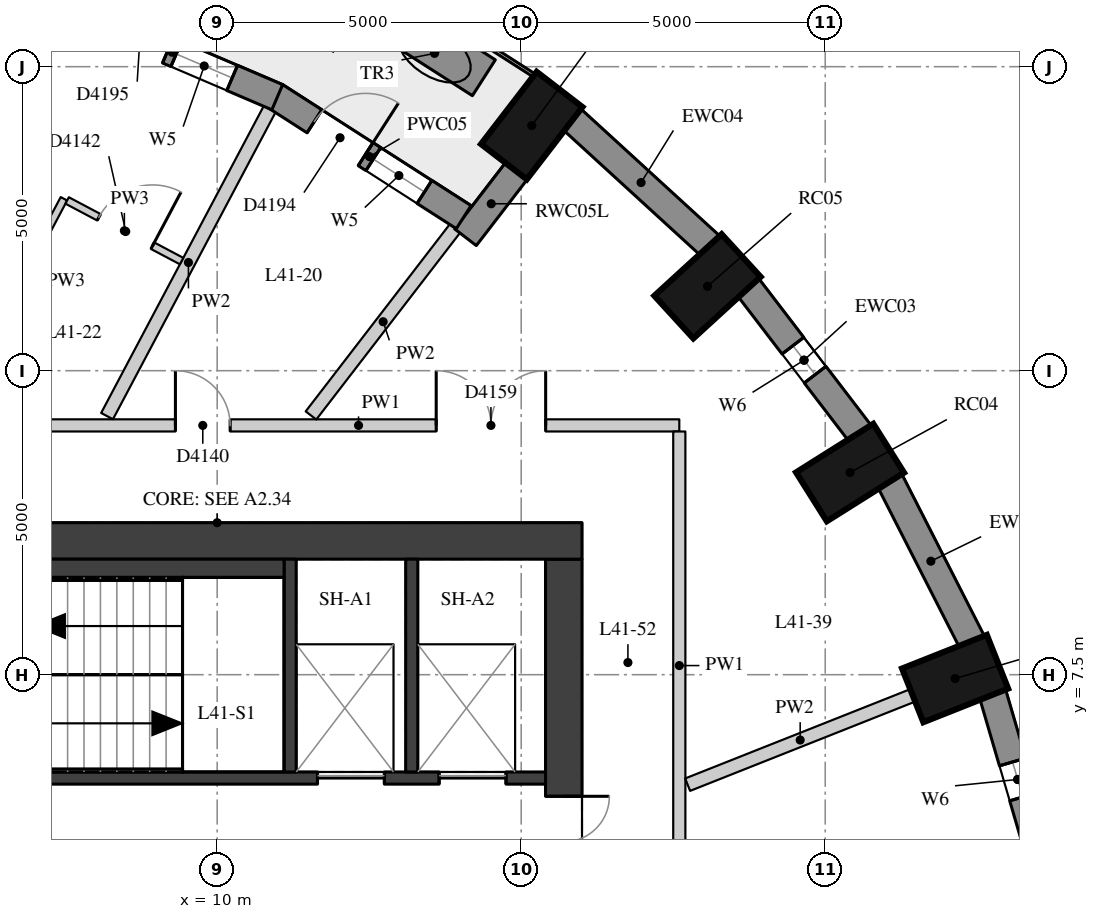
"""IFC4 building model, lengths in metres.
Left out: names, types, materials, properties, quantities, classifications, styles, units other than length and angle.
Written with IfcOpenShell. Run it as: python <this file> out.ifc"""

import sys

from ifc_helpers import new_model, si_unit, direction, frame, frame_2d, origin, origin_2d, place, context, subcontext, project, spatial, rectangle, extrude, element, fill, save


model = new_model("IFC4")
c1 = context("Model", 3, precision=1e-05, world=origin(), true_north=direction((0.0, 1.0)))
c2 = subcontext(c1, "Body", "Model", "MODEL_VIEW")
j1 = project(units=[si_unit("LENGTHUNIT", "METRE"), si_unit("PLANEANGLEUNIT", "RADIAN")], contexts=[c1])
p1 = place(None, origin())
s1 = spatial("IfcSite", under=j1, at=p1, CompositionType="ELEMENT")
p2 = place(p1, origin())
s2 = spatial("IfcBuilding", under=s1, at=p2, CompositionType="ELEMENT")
p3 = place(p2, frame((0.0, 0.0, 148.4)))
s3 = spatial("IfcBuildingStorey", under=s2, at=p3, CompositionType="ELEMENT", Elevation=148.4)
for number, where, z_axis, x_axis in (
    (1, (22.136, 7.436, 0.0), (0.0, 0.0, 1.0), (0.93, 0.369, 0.0)),
    (2, (20.408, 10.825, 0.0), (0.0, 0.0, 1.0), (0.846, 0.533, 0.0)),
    (3, (18.064, 13.888, 0.0), (0.0, 0.0, 1.0), (0.738, 0.675, 0.0)),
    (4, (15.173, 16.532, 0.0), (0.0, 0.0, 1.0), (0.61, 0.792, 0.0)),
):
    element("IfcColumn", number, at=place(p3, frame(where, z_axis=z_axis, x_axis=x_axis)), inside=s3, PredefinedType="COLUMN", context=c2, shape_type="SweptSolid", body=[
        extrude(rectangle(XDim=1.5, YDim=0.95, at=origin_2d()), origin(), (0.0, 0.0, 1.0), 3.3),
    ])
p4 = place(p3, frame((23.58, 4.362, 0.0), z_axis=(0.0, 0.0, 1.0), x_axis=(-0.281049481624, 0.959693278542, 0.0)))
e5 = element("IfcWall", 5, at=p4, inside=s3, PredefinedType="SOLIDWALL", context=c2, shape_type="SweptSolid", body=[
    extrude(rectangle(XDim=2.948, YDim=0.45, at=frame_2d((1.474, 0.0))), origin(), (0.0, 0.0, 1.0), 3.02),
])
p5 = place(p4, frame((1.174, 0.0, 0.4)))
e6 = element("IfcOpeningElement", 6, at=p5, cuts=e5, PredefinedType="OPENING", context=c2, shape_type="SweptSolid", body=[
    extrude(rectangle(XDim=0.6, YDim=1.75, at=frame_2d((0.3, 0.875))), frame((0.0, 0.235, 0.0), z_axis=(0.0, -1.0, 0.0), x_axis=(1.0, 0.0, 0.0)), (0.0, 0.0, 1.0), 0.47),
])
p6 = place(p3, frame((22.415, 8.037, 0.0), z_axis=(0.0, 0.0, 1.0), x_axis=(-0.454133999889, 0.890933392653, 0.0)))
e7 = element("IfcWall", 7, at=p6, inside=s3, PredefinedType="SOLIDWALL", context=c2, shape_type="SweptSolid", body=[
    extrude(rectangle(XDim=2.986, YDim=0.45, at=frame_2d((1.493, 0.0))), origin(), (0.0, 0.0, 1.0), 3.02),
])
p7 = place(p3, frame((20.574, 11.467, 0.0), z_axis=(0.0, 0.0, 1.0), x_axis=(-0.607817056371, 0.794077090706, 0.0)))
e8 = element("IfcWall", 8, at=p7, inside=s3, PredefinedType="SOLIDWALL", context=c2, shape_type="SweptSolid", body=[
    extrude(rectangle(XDim=3.037, YDim=0.45, at=frame_2d((1.519, 0.0))), origin(), (0.0, 0.0, 1.0), 3.02),
])
p8 = place(p7, frame((1.219, 0.0, 0.4)))
e9 = element("IfcOpeningElement", 9, at=p8, cuts=e8, PredefinedType="OPENING", context=c2, shape_type="SweptSolid", body=[
    extrude(rectangle(XDim=0.6, YDim=1.75, at=frame_2d((0.3, 0.875))), frame((0.0, 0.235, 0.0), z_axis=(0.0, -1.0, 0.0), x_axis=(1.0, 0.0, 0.0)), (0.0, 0.0, 1.0), 0.47),
])
p9 = place(p3, frame((18.113, 14.55, 0.0), z_axis=(0.0, 0.0, 1.0), x_axis=(-0.737808755941, 0.675009807082, 0.0)))
e10 = element("IfcWall", 10, at=p9, inside=s3, PredefinedType="SOLIDWALL", context=c2, shape_type="SweptSolid", body=[
    extrude(rectangle(XDim=3.094, YDim=0.45, at=frame_2d((1.547, 0.0))), origin(), (0.0, 0.0, 1.0), 3.02),
])
p10 = place(p3, frame((14.931, 15.797, 0.0), z_axis=(0.0, 0.0, 1.0), x_axis=(-0.609897399413, -0.792480385996, 0.0)))
e11 = element("IfcWall", 11, at=p10, inside=s3, PredefinedType="SOLIDWALL", context=c2, shape_type="SweptSolid", body=[
    extrude(rectangle(XDim=1.391, YDim=0.45, at=frame_2d((0.695, 0.0))), origin(), (0.0, 0.0, 1.0), 3.02),
])
p11 = place(p3, frame((14.054, 15.025, 0.0), z_axis=(0.0, 0.0, 1.0), x_axis=(-0.841393801846, 0.54042249233, 0.0)))
e12 = element("IfcWall", 12, at=p11, inside=s3, PredefinedType="SOLIDWALL", context=c2, shape_type="SweptSolid", body=[
    extrude(rectangle(XDim=3.683, YDim=0.45, at=frame_2d((1.841, 0.0))), origin(), (0.0, 0.0, 1.0), 3.02),
])
p12 = place(p11, frame((0.766, 0.0, 0.4)))
e13 = element("IfcOpeningElement", 13, at=p12, cuts=e12, PredefinedType="OPENING", context=c2, shape_type="SweptSolid", body=[
    extrude(rectangle(XDim=1.0, YDim=1.75, at=frame_2d((0.5, 0.875))), frame((0.0, 0.235, 0.0), z_axis=(0.0, -1.0, 0.0), x_axis=(1.0, 0.0, 0.0)), (0.0, 0.0, 1.0), 0.47),
])
p13 = place(p11, frame((1.916, 0.0, 0.0)))
e14 = element("IfcOpeningElement", 14, at=p13, cuts=e12, PredefinedType="OPENING", context=c2, shape_type="SweptSolid", body=[
    extrude(rectangle(XDim=1.0, YDim=2.15, at=frame_2d((0.5, 1.075))), frame((0.0, 0.235, 0.0), z_axis=(0.0, -1.0, 0.0), x_axis=(1.0, 0.0, 0.0)), (0.0, 0.0, 1.0), 0.47),
])
p14 = place(p3, frame((10.988, 16.998, 0.0), z_axis=(0.0, 0.0, 1.0), x_axis=(-0.919443425894, 0.393222311907, 0.0)))
e15 = element("IfcWall", 15, at=p14, inside=s3, PredefinedType="SOLIDWALL", context=c2, shape_type="SweptSolid", body=[
    extrude(rectangle(XDim=3.763, YDim=0.45, at=frame_2d((1.882, 0.0))), origin(), (0.0, 0.0, 1.0), 3.02),
])
p15 = place(p14, frame((0.807, 0.0, 0.4)))
e16 = element("IfcOpeningElement", 16, at=p15, cuts=e15, PredefinedType="OPENING", context=c2, shape_type="SweptSolid", body=[
    extrude(rectangle(XDim=1.0, YDim=1.75, at=frame_2d((0.5, 0.875))), frame((0.0, 0.235, 0.0), z_axis=(0.0, -1.0, 0.0), x_axis=(1.0, 0.0, 0.0)), (0.0, 0.0, 1.0), 0.47),
])
p16 = place(p14, frame((1.957, 0.0, 0.0)))
e17 = element("IfcOpeningElement", 17, at=p16, cuts=e15, PredefinedType="OPENING", context=c2, shape_type="SweptSolid", body=[
    extrude(rectangle(XDim=1.0, YDim=2.15, at=frame_2d((0.5, 1.075))), frame((0.0, 0.235, 0.0), z_axis=(0.0, -1.0, 0.0), x_axis=(1.0, 0.0, 0.0)), (0.0, 0.0, 1.0), 0.47),
])
p17 = place(p3, frame((14.386, 17.318, 0.0), z_axis=(0.0, 0.0, 1.0), x_axis=(-0.842032375698, 0.539426990682, 0.0)))
e18 = element("IfcWall", 18, at=p17, inside=s3, PredefinedType="USERDEFINED", context=c2, shape_type="SweptSolid", body=[
    extrude(rectangle(XDim=1.8, YDim=0.7, at=frame_2d((0.9, 0.0))), origin(), (0.0, 0.0, 1.0), 0.75),
])
p18 = place(p3, frame((15.7, -9.4, 0.0), z_axis=(0.0, 0.0, 1.0), x_axis=(0.0, 1.0, 0.0)))
e19 = element("IfcWall", 19, at=p18, inside=s3, PredefinedType="SHEAR", context=c2, shape_type="SweptSolid", body=[
    extrude(rectangle(XDim=18.8, YDim=0.6, at=frame_2d((9.4, 0.0))), origin(), (0.0, 0.0, 1.0), 3.02),
])
p19 = place(p18, frame((13.4, 0.0, 0.0)))
e20 = element("IfcOpeningElement", 20, at=p19, cuts=e19, PredefinedType="OPENING", context=c2, shape_type="SweptSolid", body=[
    extrude(rectangle(XDim=1.5, YDim=2.1, at=frame_2d((0.75, 1.05))), frame((0.0, 0.31, 0.0), z_axis=(0.0, -1.0, 0.0), x_axis=(1.0, 0.0, 0.0)), (0.0, 0.0, 1.0), 0.62),
])
p20 = place(p18, frame((3.9, 0.0, 0.0)))
e21 = element("IfcOpeningElement", 21, at=p20, cuts=e19, PredefinedType="OPENING", context=c2, shape_type="SweptSolid", body=[
    extrude(rectangle(XDim=1.5, YDim=2.1, at=frame_2d((0.75, 1.05))), frame((0.0, 0.31, 0.0), z_axis=(0.0, -1.0, 0.0), x_axis=(1.0, 0.0, 0.0)), (0.0, 0.0, 1.0), 0.62),
])
p21 = place(p3, frame((4.0, 9.7, 0.0), z_axis=(0.0, 0.0, 1.0), x_axis=(1.0, 0.0, 0.0)))
e22 = element("IfcWall", 22, at=p21, inside=s3, PredefinedType="SHEAR", context=c2, shape_type="SweptSolid", body=[
    extrude(rectangle(XDim=12.0, YDim=0.6, at=frame_2d((6.0, 0.0))), origin(), (0.0, 0.0, 1.0), 3.02),
])
p22 = place(p3, frame((4.6, 5.8, 0.0), z_axis=(0.0, 0.0, 1.0), x_axis=(1.0, 0.0, 0.0)))
e23 = element("IfcWall", 23, at=p22, inside=s3, PredefinedType="SHEAR", context=c2, shape_type="SweptSolid", body=[
    extrude(rectangle(XDim=10.8, YDim=0.2, at=frame_2d((5.4, 0.0))), origin(), (0.0, 0.0, 1.0), 3.02),
])
p23 = place(p22, frame((7.05, 0.0, 0.0)))
e24 = element("IfcOpeningElement", 24, at=p23, cuts=e23, PredefinedType="OPENING", context=c2, shape_type="SweptSolid", body=[
    extrude(rectangle(XDim=1.1, YDim=2.1, at=frame_2d((0.55, 1.05))), frame((0.0, 0.11, 0.0), z_axis=(0.0, -1.0, 0.0), x_axis=(1.0, 0.0, 0.0)), (0.0, 0.0, 1.0), 0.22),
])
p24 = place(p22, frame((9.05, 0.0, 0.0)))
e25 = element("IfcOpeningElement", 25, at=p24, cuts=e23, PredefinedType="OPENING", context=c2, shape_type="SweptSolid", body=[
    extrude(rectangle(XDim=1.1, YDim=2.1, at=frame_2d((0.55, 1.05))), frame((0.0, 0.11, 0.0), z_axis=(0.0, -1.0, 0.0), x_axis=(1.0, 0.0, 0.0)), (0.0, 0.0, 1.0), 0.22),
])
for number, where, z_axis, x_axis in (
    (26, (11.2, 5.9, 0.0), (0.0, 0.0, 1.0), (0.0, 1.0, 0.0)),
    (27, (13.2, 5.9, 0.0), (0.0, 0.0, 1.0), (0.0, 1.0, 0.0)),
):
    element("IfcWall", number, at=place(p3, frame(where, z_axis=z_axis, x_axis=x_axis)), inside=s3, PredefinedType="SHEAR", context=c2, shape_type="SweptSolid", body=[
        extrude(rectangle(XDim=3.5, YDim=0.2, at=frame_2d((1.75, 0.0))), origin(), (0.0, 0.0, 1.0), 3.02),
    ])
p25 = place(p3, frame((6.22, 9.25, 0.0), z_axis=(0.0, 0.0, 1.0), x_axis=(1.0, 0.0, 0.0)))
e28 = element("IfcWall", 28, at=p25, inside=s3, PredefinedType="PARTITIONING", context=c2, shape_type="SweptSolid", body=[
    extrude(rectangle(XDim=4.88, YDim=0.3, at=frame_2d((2.44, 0.0))), origin(), (0.0, 0.0, 1.0), 3.02),
])
p26 = place(p3, frame((7.05, 11.6, 0.0), z_axis=(0.0, 0.0, 1.0), x_axis=(1.0, 0.0, 0.0)))
e29 = element("IfcWall", 29, at=p26, inside=s3, PredefinedType="PARTITIONING", context=c2, shape_type="SweptSolid", body=[
    extrude(rectangle(XDim=10.551, YDim=0.2, at=frame_2d((5.275, 0.0))), origin(), (0.0, 0.0, 1.0), 3.02),
])
p27 = place(p26, frame((2.264, 0.0, 0.0)))
e30 = element("IfcOpeningElement", 30, at=p27, cuts=e29, PredefinedType="OPENING", context=c2, shape_type="SweptSolid", body=[
    extrude(rectangle(XDim=0.9, YDim=2.1, at=frame_2d((0.45, 1.05))), frame((0.0, 0.11, 0.0), z_axis=(0.0, -1.0, 0.0), x_axis=(1.0, 0.0, 0.0)), (0.0, 0.0, 1.0), 0.22),
])
p28 = place(p26, frame((6.553, 0.0, 0.0)))
e31 = element("IfcOpeningElement", 31, at=p28, cuts=e29, PredefinedType="OPENING", context=c2, shape_type="SweptSolid", body=[
    extrude(rectangle(XDim=1.8, YDim=2.1, at=frame_2d((0.9, 1.05))), frame((0.0, 0.11, 0.0), z_axis=(0.0, -1.0, 0.0), x_axis=(1.0, 0.0, 0.0)), (0.0, 0.0, 1.0), 0.22),
])
p29 = place(p3, frame((17.6, 11.5, 0.0), z_axis=(0.0, 0.0, 1.0), x_axis=(0.0, -1.0, 0.0)))
e32 = element("IfcWall", 32, at=p29, inside=s3, PredefinedType="PARTITIONING", context=c2, shape_type="SweptSolid", body=[
    extrude(rectangle(XDim=7.7, YDim=0.2, at=frame_2d((3.85, 0.0))), origin(), (0.0, 0.0, 1.0), 3.02),
])
p30 = place(p3, frame((21.439, 7.16, 0.0), z_axis=(0.0, 0.0, 1.0), x_axis=(-0.929517399972, -0.368778257426, 0.0)))
e33 = element("IfcWall", 33, at=p30, inside=s3, PredefinedType="PARTITIONING", context=c2, shape_type="SweptSolid", body=[
    extrude(rectangle(XDim=3.982, YDim=0.22, at=frame_2d((1.991, 0.0))), origin(), (0.0, 0.0, 1.0), 3.02),
])
p31 = place(p3, frame((13.916, 14.846, 0.0), z_axis=(0.0, 0.0, 1.0), x_axis=(-0.610023079405, -0.792383646091, 0.0)))
e34 = element("IfcWall", 34, at=p31, inside=s3, PredefinedType="PARTITIONING", context=c2, shape_type="SweptSolid", body=[
    extrude(rectangle(XDim=3.89, YDim=0.22, at=frame_2d((1.945, 0.0))), origin(), (0.0, 0.0, 1.0), 3.02),
])
p32 = place(p3, frame((10.865, 16.806, 0.0), z_axis=(0.0, 0.0, 1.0), x_axis=(-0.468046615648, -0.883703777054, 0.0)))
e35 = element("IfcWall", 35, at=p32, inside=s3, PredefinedType="PARTITIONING", context=c2, shape_type="SweptSolid", body=[
    extrude(rectangle(XDim=5.718, YDim=0.22, at=frame_2d((2.859, 0.0))), origin(), (0.0, 0.0, 1.0), 3.02),
])
p33 = place(p3, frame((6.042, 12.614, 0.0), z_axis=(0.0, 0.0, 1.0), x_axis=(0.46804844257, 0.883702809438, 0.0)))
e36 = element("IfcWall", 36, at=p33, inside=s3, PredefinedType="PARTITIONING", context=c2, shape_type="SweptSolid", body=[
    extrude(rectangle(XDim=3.071, YDim=0.12, at=frame_2d((1.535, 0.0))), origin(), (0.0, 0.0, 1.0), 3.02),
])
p34 = place(p3, frame((7.532, 15.3, 0.0), z_axis=(0.0, 0.0, 1.0), x_axis=(0.883707061275, -0.468040414764, 0.0)))
e37 = element("IfcWall", 37, at=p34, inside=s3, PredefinedType="PARTITIONING", context=c2, shape_type="SweptSolid", body=[
    extrude(rectangle(XDim=2.13, YDim=0.12, at=frame_2d((1.065, 0.0))), origin(), (0.0, 0.0, 1.0), 3.02),
])
p35 = place(p34, frame((0.59, 0.0, 0.0)))
e38 = element("IfcOpeningElement", 38, at=p35, cuts=e37, PredefinedType="OPENING", context=c2, shape_type="SweptSolid", body=[
    extrude(rectangle(XDim=1.0, YDim=2.1, at=frame_2d((0.5, 1.05))), frame((0.0, 0.07, 0.0), z_axis=(0.0, -1.0, 0.0), x_axis=(1.0, 0.0, 0.0)), (0.0, 0.0, 1.0), 0.14),
])
p36 = place(p5, origin())
e39 = element("IfcWindow", 39, at=p36, inside=s3, PartitioningType="SINGLE_PANEL", PredefinedType="WINDOW", context=c2, shape_type="SweptSolid", body=[
    extrude(rectangle(XDim=0.6, YDim=1.75, at=frame_2d((0.3, 0.875))), frame((0.0, 0.035, 0.0), z_axis=(0.0, -1.0, 0.0), x_axis=(1.0, 0.0, 0.0)), (0.0, 0.0, 1.0), 0.06),
])
fill(e6, e39)
p37 = place(p8, origin())
e40 = element("IfcWindow", 40, at=p37, inside=s3, PartitioningType="SINGLE_PANEL", PredefinedType="WINDOW", context=c2, shape_type="SweptSolid", body=[
    extrude(rectangle(XDim=0.6, YDim=1.75, at=frame_2d((0.3, 0.875))), frame((0.0, 0.035, 0.0), z_axis=(0.0, -1.0, 0.0), x_axis=(1.0, 0.0, 0.0)), (0.0, 0.0, 1.0), 0.06),
])
fill(e9, e40)
p38 = place(p12, origin())
e41 = element("IfcWindow", 41, at=p38, inside=s3, PartitioningType="SINGLE_PANEL", PredefinedType="WINDOW", context=c2, shape_type="SweptSolid", body=[
    extrude(rectangle(XDim=1.0, YDim=1.75, at=frame_2d((0.5, 0.875))), frame((0.0, 0.035, 0.0), z_axis=(0.0, -1.0, 0.0), x_axis=(1.0, 0.0, 0.0)), (0.0, 0.0, 1.0), 0.06),
])
fill(e13, e41)
p39 = place(p13, frame((1.0, 0.0, 0.0), z_axis=(0.0, 0.0, 1.0), x_axis=(-1.0, 0.0, 0.0)))
e42 = element("IfcDoor", 42, at=p39, inside=s3, OperationType="SINGLE_SWING_RIGHT", PredefinedType="DOOR", context=c2, shape_type="SweptSolid", body=[
    extrude(rectangle(XDim=1.0, YDim=2.15, at=frame_2d((0.5, 1.075))), frame((0.0, 0.075, 0.0), z_axis=(0.0, -1.0, 0.0), x_axis=(1.0, 0.0, 0.0)), (0.0, 0.0, 1.0), 0.05),
])
fill(e14, e42)
p40 = place(p15, origin())
e43 = element("IfcWindow", 43, at=p40, inside=s3, PartitioningType="SINGLE_PANEL", PredefinedType="WINDOW", context=c2, shape_type="SweptSolid", body=[
    extrude(rectangle(XDim=1.0, YDim=1.75, at=frame_2d((0.5, 0.875))), frame((0.0, 0.035, 0.0), z_axis=(0.0, -1.0, 0.0), x_axis=(1.0, 0.0, 0.0)), (0.0, 0.0, 1.0), 0.06),
])
fill(e16, e43)
p41 = place(p19, origin())
e44 = element("IfcDoor", 44, at=p41, inside=s3, OperationType="DOUBLE_DOOR_SINGLE_SWING", PredefinedType="DOOR", context=c2, shape_type="SweptSolid", body=[
    extrude(rectangle(XDim=1.5, YDim=2.1, at=frame_2d((0.75, 1.05))), frame((0.0, 0.025, 0.0), z_axis=(0.0, -1.0, 0.0), x_axis=(1.0, 0.0, 0.0)), (0.0, 0.0, 1.0), 0.05),
])
fill(e20, e44)
p42 = place(p23, origin())
e45 = element("IfcDoor", 45, at=p42, inside=s3, OperationType="DOUBLE_DOOR_SLIDING", PredefinedType="DOOR", context=c2, shape_type="SweptSolid", body=[
    extrude(rectangle(XDim=1.1, YDim=2.1, at=frame_2d((0.55, 1.05))), frame((0.0, 0.025, 0.0), z_axis=(0.0, -1.0, 0.0), x_axis=(1.0, 0.0, 0.0)), (0.0, 0.0, 1.0), 0.05),
])
fill(e24, e45)
p43 = place(p24, origin())
e46 = element("IfcDoor", 46, at=p43, inside=s3, OperationType="DOUBLE_DOOR_SLIDING", PredefinedType="DOOR", context=c2, shape_type="SweptSolid", body=[
    extrude(rectangle(XDim=1.1, YDim=2.1, at=frame_2d((0.55, 1.05))), frame((0.0, 0.025, 0.0), z_axis=(0.0, -1.0, 0.0), x_axis=(1.0, 0.0, 0.0)), (0.0, 0.0, 1.0), 0.05),
])
fill(e25, e46)
p44 = place(p27, origin())
e47 = element("IfcDoor", 47, at=p44, inside=s3, OperationType="SINGLE_SWING_LEFT", PredefinedType="DOOR", context=c2, shape_type="SweptSolid", body=[
    extrude(rectangle(XDim=0.9, YDim=2.1, at=frame_2d((0.45, 1.05))), frame((0.0, 0.025, 0.0), z_axis=(0.0, -1.0, 0.0), x_axis=(1.0, 0.0, 0.0)), (0.0, 0.0, 1.0), 0.05),
])
fill(e30, e47)
p45 = place(p35, origin())
e48 = element("IfcDoor", 48, at=p45, inside=s3, OperationType="SINGLE_SWING_RIGHT", PredefinedType="DOOR", context=c2, shape_type="SweptSolid", body=[
    extrude(rectangle(XDim=1.0, YDim=2.1, at=frame_2d((0.5, 1.05))), frame((0.0, 0.025, 0.0), z_axis=(0.0, -1.0, 0.0), x_axis=(1.0, 0.0, 0.0)), (0.0, 0.0, 1.0), 0.05),
])
fill(e38, e48)
p46 = place(p28, origin())
e49 = element("IfcDoor", 49, at=p46, inside=s3, OperationType="DOUBLE_DOOR_SINGLE_SWING", PredefinedType="DOOR", context=c2, shape_type="SweptSolid", body=[
    extrude(rectangle(XDim=1.8, YDim=2.1, at=frame_2d((0.9, 1.05))), frame((0.0, 0.025, 0.0), z_axis=(0.0, -1.0, 0.0), x_axis=(1.0, 0.0, 0.0)), (0.0, 0.0, 1.0), 0.05),
])
fill(e31, e49)
save(model, sys.argv[1])
